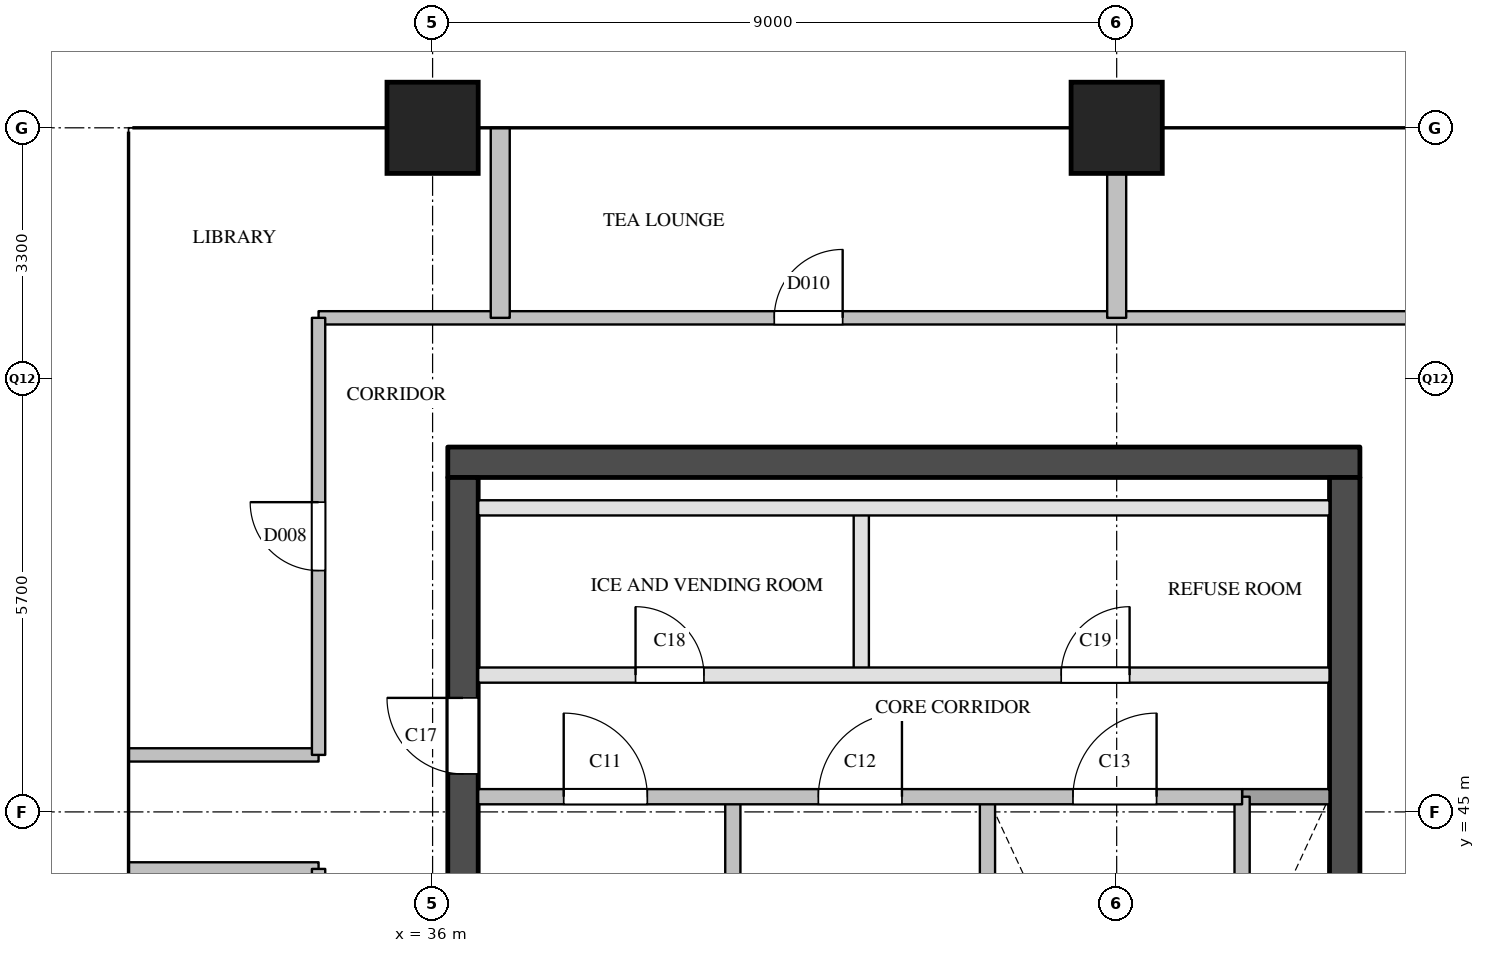
"""IFC4 building model, lengths in metres.
Left out: names, types, materials, properties, quantities, classifications, styles, units other than length and angle.
Written with IfcOpenShell. Run it as: python <this file> out.ifc"""

import sys

from ifc_helpers import new_model, si_unit, direction, frame, frame_2d, origin, origin_2d, place, context, subcontext, project, spatial, rectangle, extrude, element, fill, save


model = new_model("IFC4")
c1 = context("Model", 3, precision=1e-05, world=origin(), true_north=direction((0.0, 1.0)))
c2 = subcontext(c1, "Body", "Model", "MODEL_VIEW")
j1 = project(units=[si_unit("LENGTHUNIT", "METRE"), si_unit("PLANEANGLEUNIT", "RADIAN")], contexts=[c1])
p1 = place(None, origin())
s1 = spatial("IfcSite", under=j1, at=p1, CompositionType="ELEMENT")
p2 = place(p1, origin())
s2 = spatial("IfcBuilding", under=s1, at=p2, CompositionType="ELEMENT")
p3 = place(p2, frame((0.0, 0.0, 218.9)))
s3 = spatial("IfcBuildingStorey", under=s2, at=p3, CompositionType="ELEMENT", Elevation=218.9)
for number, where, z_axis, x_axis in (
    (1, (36.0, 54.0, 0.0), (0.0, 0.0, 1.0), (1.0, 0.0, 0.0)),
    (2, (45.0, 54.0, 0.0), (0.0, 0.0, 1.0), (1.0, 0.0, 0.0)),
):
    element("IfcColumn", number, at=place(p3, frame(where, z_axis=z_axis, x_axis=x_axis)), inside=s3, PredefinedType="COLUMN", context=c2, shape_type="SweptSolid", body=[
        extrude(rectangle(XDim=1.2, YDim=1.2, at=origin_2d()), origin(), (0.0, 0.0, 1.0), 3.9),
    ])
p4 = place(p3, frame((36.2, 49.6, 0.0), z_axis=(0.0, 0.0, 1.0), x_axis=(1.0, 0.0, 0.0)))
e3 = element("IfcWall", 3, at=p4, inside=s3, PredefinedType="SHEAR", context=c2, shape_type="SweptSolid", body=[
    extrude(rectangle(XDim=12.0, YDim=0.4, at=frame_2d((6.0, 0.0))), origin(), (0.0, 0.0, 1.0), 3.6),
])
p5 = place(p3, frame((36.4, 29.1, 0.0), z_axis=(0.0, 0.0, 1.0), x_axis=(0.0, 1.0, 0.0)))
e4 = element("IfcWall", 4, at=p5, inside=s3, PredefinedType="SHEAR", context=c2, shape_type="SweptSolid", body=[
    extrude(rectangle(XDim=20.3, YDim=0.4, at=frame_2d((10.15, 0.0))), origin(), (0.0, 0.0, 1.0), 3.6),
])
p6 = place(p5, frame((3.6, 0.0, 0.0)))
e5 = element("IfcOpeningElement", 5, at=p6, cuts=e4, PredefinedType="OPENING", context=c2, shape_type="SweptSolid", body=[
    extrude(rectangle(XDim=1.8, YDim=2.1, at=frame_2d((0.9, 1.05))), frame((0.0, 0.21, 0.0), z_axis=(0.0, -1.0, 0.0), x_axis=(1.0, 0.0, 0.0)), (0.0, 0.0, 1.0), 0.42),
])
p7 = place(p5, frame((16.4, 0.0, 0.0)))
e6 = element("IfcOpeningElement", 6, at=p7, cuts=e4, PredefinedType="OPENING", context=c2, shape_type="SweptSolid", body=[
    extrude(rectangle(XDim=1.0, YDim=2.1, at=frame_2d((0.5, 1.05))), frame((0.0, 0.21, 0.0), z_axis=(0.0, -1.0, 0.0), x_axis=(1.0, 0.0, 0.0)), (0.0, 0.0, 1.0), 0.42),
])
p8 = place(p3, frame((48.0, 29.1, 0.0), z_axis=(0.0, 0.0, 1.0), x_axis=(0.0, 1.0, 0.0)))
e7 = element("IfcWall", 7, at=p8, inside=s3, PredefinedType="SHEAR", context=c2, shape_type="SweptSolid", body=[
    extrude(rectangle(XDim=20.3, YDim=0.4, at=frame_2d((10.15, 0.0))), origin(), (0.0, 0.0, 1.0), 3.6),
])
p9 = place(p8, frame((12.5, 0.0, 0.0)))
e8 = element("IfcOpeningElement", 8, at=p9, cuts=e7, PredefinedType="OPENING", context=c2, shape_type="SweptSolid", body=[
    extrude(rectangle(XDim=0.7, YDim=2.1, at=frame_2d((0.35, 1.05))), frame((0.0, 0.21, 0.0), z_axis=(0.0, -1.0, 0.0), x_axis=(1.0, 0.0, 0.0)), (0.0, 0.0, 1.0), 0.42),
])
p10 = place(p8, frame((3.9, 0.0, 0.0)))
e9 = element("IfcOpeningElement", 9, at=p10, cuts=e7, PredefinedType="OPENING", context=c2, shape_type="SweptSolid", body=[
    extrude(rectangle(XDim=1.8, YDim=2.1, at=frame_2d((0.9, 1.05))), frame((0.0, 0.21, 0.0), z_axis=(0.0, -1.0, 0.0), x_axis=(1.0, 0.0, 0.0)), (0.0, 0.0, 1.0), 0.42),
])
p11 = place(p3, frame((39.95, 40.78, 0.0), z_axis=(0.0, 0.0, 1.0), x_axis=(0.0, 1.0, 0.0)))
e10 = element("IfcWall", 10, at=p11, inside=s3, PredefinedType="SOLIDWALL", context=c2, shape_type="SweptSolid", body=[
    extrude(rectangle(XDim=4.42, YDim=0.2, at=frame_2d((2.21, 0.0))), origin(), (0.0, 0.0, 1.0), 3.6),
])
p12 = place(p3, frame((41.64, 46.8, 0.0), z_axis=(0.0, 0.0, 1.0), x_axis=(0.0, 1.0, 0.0)))
e11 = element("IfcWall", 11, at=p12, inside=s3, PredefinedType="PARTITIONING", context=c2, shape_type="SweptSolid", body=[
    extrude(rectangle(XDim=2.2, YDim=0.2, at=frame_2d((1.1, 0.0))), origin(), (0.0, 0.0, 1.0), 3.6),
])
for number, where, z_axis, x_axis in (
    (12, (43.3, 40.78, 0.0), (0.0, 0.0, 1.0), (0.0, 1.0, 0.0)),
    (13, (46.65, 40.78, 0.0), (0.0, 0.0, 1.0), (0.0, 1.0, 0.0)),
):
    element("IfcWall", number, at=place(p3, frame(where, z_axis=z_axis, x_axis=x_axis)), inside=s3, PredefinedType="SOLIDWALL", context=c2, shape_type="SweptSolid", body=[
        extrude(rectangle(XDim=4.42, YDim=0.2, at=frame_2d((2.21, 0.0))), origin(), (0.0, 0.0, 1.0), 3.6),
    ])
p13 = place(p3, frame((46.65, 45.2, 0.0), z_axis=(0.0, 0.0, 1.0), x_axis=(1.0, 0.0, 0.0)))
e14 = element("IfcWall", 14, at=p13, inside=s3, PredefinedType="SOLIDWALL", context=c2, shape_type="SweptSolid", body=[
    extrude(rectangle(XDim=1.15, YDim=0.2, at=frame_2d((0.575, 0.0))), origin(), (0.0, 0.0, 1.0), 3.6),
])
p14 = place(p3, frame((36.6, 45.2, 0.0), z_axis=(0.0, 0.0, 1.0), x_axis=(1.0, 0.0, 0.0)))
e15 = element("IfcWall", 15, at=p14, inside=s3, PredefinedType="SOLIDWALL", context=c2, shape_type="SweptSolid", body=[
    extrude(rectangle(XDim=10.05, YDim=0.2, at=frame_2d((5.025, 0.0))), origin(), (0.0, 0.0, 1.0), 3.6),
])
p15 = place(p14, frame((1.125, 0.0, 0.0)))
e16 = element("IfcOpeningElement", 16, at=p15, cuts=e15, PredefinedType="OPENING", context=c2, shape_type="SweptSolid", body=[
    extrude(rectangle(XDim=1.1, YDim=2.1, at=frame_2d((0.55, 1.05))), frame((0.0, 0.11, 0.0), z_axis=(0.0, -1.0, 0.0), x_axis=(1.0, 0.0, 0.0)), (0.0, 0.0, 1.0), 0.22),
])
p16 = place(p14, frame((4.475, 0.0, 0.0)))
e17 = element("IfcOpeningElement", 17, at=p16, cuts=e15, PredefinedType="OPENING", context=c2, shape_type="SweptSolid", body=[
    extrude(rectangle(XDim=1.1, YDim=2.1, at=frame_2d((0.55, 1.05))), frame((0.0, 0.11, 0.0), z_axis=(0.0, -1.0, 0.0), x_axis=(1.0, 0.0, 0.0)), (0.0, 0.0, 1.0), 0.22),
])
p17 = place(p14, frame((7.825, 0.0, 0.0)))
e18 = element("IfcOpeningElement", 18, at=p17, cuts=e15, PredefinedType="OPENING", context=c2, shape_type="SweptSolid", body=[
    extrude(rectangle(XDim=1.1, YDim=2.1, at=frame_2d((0.55, 1.05))), frame((0.0, 0.11, 0.0), z_axis=(0.0, -1.0, 0.0), x_axis=(1.0, 0.0, 0.0)), (0.0, 0.0, 1.0), 0.22),
])
p18 = place(p3, frame((36.6, 46.8, 0.0), z_axis=(0.0, 0.0, 1.0), x_axis=(1.0, 0.0, 0.0)))
e19 = element("IfcWall", 19, at=p18, inside=s3, PredefinedType="PARTITIONING", context=c2, shape_type="SweptSolid", body=[
    extrude(rectangle(XDim=11.2, YDim=0.2, at=frame_2d((5.6, 0.0))), origin(), (0.0, 0.0, 1.0), 3.6),
])
p19 = place(p18, frame((2.07, 0.0, 0.0)))
e20 = element("IfcOpeningElement", 20, at=p19, cuts=e19, PredefinedType="OPENING", context=c2, shape_type="SweptSolid", body=[
    extrude(rectangle(XDim=0.9, YDim=2.1, at=frame_2d((0.45, 1.05))), frame((0.0, 0.11, 0.0), z_axis=(0.0, -1.0, 0.0), x_axis=(1.0, 0.0, 0.0)), (0.0, 0.0, 1.0), 0.22),
])
p20 = place(p18, frame((7.67, 0.0, 0.0)))
e21 = element("IfcOpeningElement", 21, at=p20, cuts=e19, PredefinedType="OPENING", context=c2, shape_type="SweptSolid", body=[
    extrude(rectangle(XDim=0.9, YDim=2.1, at=frame_2d((0.45, 1.05))), frame((0.0, 0.11, 0.0), z_axis=(0.0, -1.0, 0.0), x_axis=(1.0, 0.0, 0.0)), (0.0, 0.0, 1.0), 0.22),
])
p21 = place(p3, frame((36.6, 49.0, 0.0), z_axis=(0.0, 0.0, 1.0), x_axis=(1.0, 0.0, 0.0)))
e22 = element("IfcWall", 22, at=p21, inside=s3, PredefinedType="PARTITIONING", context=c2, shape_type="SweptSolid", body=[
    extrude(rectangle(XDim=11.2, YDim=0.2, at=frame_2d((5.6, 0.0))), origin(), (0.0, 0.0, 1.0), 3.6),
])
for number, where, z_axis, x_axis in (
    (23, (32.0, 44.25, 0.0), (0.0, 0.0, 1.0), (1.0, 0.0, 0.0)),
    (24, (32.0, 45.75, 0.0), (0.0, 0.0, 1.0), (1.0, 0.0, 0.0)),
):
    element("IfcWall", number, at=place(p3, frame(where, z_axis=z_axis, x_axis=x_axis)), inside=s3, PredefinedType="PARTITIONING", context=c2, shape_type="SweptSolid", body=[
        extrude(rectangle(XDim=2.5, YDim=0.175, at=frame_2d((1.25, 0.0))), origin(), (0.0, 0.0, 1.0), 3.6),
    ])
p22 = place(p3, frame((34.5, 51.5, 0.0), z_axis=(0.0, 0.0, 1.0), x_axis=(1.0, 0.0, 0.0)))
e25 = element("IfcWall", 25, at=p22, inside=s3, PredefinedType="PARTITIONING", context=c2, shape_type="SweptSolid", body=[
    extrude(rectangle(XDim=15.4, YDim=0.175, at=frame_2d((7.7, 0.0))), origin(), (0.0, 0.0, 1.0), 3.6),
])
p23 = place(p22, frame((5.995, 0.0, 0.0)))
e26 = element("IfcOpeningElement", 26, at=p23, cuts=e25, PredefinedType="OPENING", context=c2, shape_type="SweptSolid", body=[
    extrude(rectangle(XDim=0.9, YDim=2.1, at=frame_2d((0.45, 1.05))), frame((0.0, 0.097, 0.0), z_axis=(0.0, -1.0, 0.0), x_axis=(1.0, 0.0, 0.0)), (0.0, 0.0, 1.0), 0.195),
])
p24 = place(p3, frame((34.5, 28.5, 0.0), z_axis=(0.0, 0.0, 1.0), x_axis=(0.0, 1.0, 0.0)))
e27 = element("IfcWall", 27, at=p24, inside=s3, PredefinedType="PARTITIONING", context=c2, shape_type="SweptSolid", body=[
    extrude(rectangle(XDim=15.75, YDim=0.175, at=frame_2d((7.875, 0.0))), origin(), (0.0, 0.0, 1.0), 3.6),
])
p25 = place(p24, frame((3.3, 0.0, 0.0)))
e28 = element("IfcOpeningElement", 28, at=p25, cuts=e27, PredefinedType="OPENING", context=c2, shape_type="SweptSolid", body=[
    extrude(rectangle(XDim=0.9, YDim=2.1, at=frame_2d((0.45, 1.05))), frame((0.0, 0.097, 0.0), z_axis=(0.0, -1.0, 0.0), x_axis=(1.0, 0.0, 0.0)), (0.0, 0.0, 1.0), 0.195),
])
p26 = place(p24, frame((11.175, 0.0, 0.0)))
e29 = element("IfcOpeningElement", 29, at=p26, cuts=e27, PredefinedType="OPENING", context=c2, shape_type="SweptSolid", body=[
    extrude(rectangle(XDim=0.9, YDim=2.1, at=frame_2d((0.45, 1.05))), frame((0.0, 0.097, 0.0), z_axis=(0.0, -1.0, 0.0), x_axis=(1.0, 0.0, 0.0)), (0.0, 0.0, 1.0), 0.195),
])
p27 = place(p3, frame((34.5, 45.75, 0.0), z_axis=(0.0, 0.0, 1.0), x_axis=(0.0, 1.0, 0.0)))
e30 = element("IfcWall", 30, at=p27, inside=s3, PredefinedType="PARTITIONING", context=c2, shape_type="SweptSolid", body=[
    extrude(rectangle(XDim=5.75, YDim=0.175, at=frame_2d((2.875, 0.0))), origin(), (0.0, 0.0, 1.0), 3.6),
])
p28 = place(p27, frame((2.425, 0.0, 0.0)))
e31 = element("IfcOpeningElement", 31, at=p28, cuts=e30, PredefinedType="OPENING", context=c2, shape_type="SweptSolid", body=[
    extrude(rectangle(XDim=0.9, YDim=2.1, at=frame_2d((0.45, 1.05))), frame((0.0, 0.097, 0.0), z_axis=(0.0, -1.0, 0.0), x_axis=(1.0, 0.0, 0.0)), (0.0, 0.0, 1.0), 0.195),
])
p29 = place(p3, frame((36.89, 51.5, 0.0), z_axis=(0.0, 0.0, 1.0), x_axis=(0.0, 1.0, 0.0)))
e32 = element("IfcWall", 32, at=p29, inside=s3, PredefinedType="PARTITIONING", context=c2, shape_type="SweptSolid", body=[
    extrude(rectangle(XDim=2.5, YDim=0.25, at=frame_2d((1.25, 0.0))), origin(), (0.0, 0.0, 1.0), 2.6),
])
p30 = place(p3, frame((45.0, 51.5, 0.0), z_axis=(0.0, 0.0, 1.0), x_axis=(0.0, 1.0, 0.0)))
e33 = element("IfcWall", 33, at=p30, inside=s3, PredefinedType="PARTITIONING", context=c2, shape_type="SweptSolid", body=[
    extrude(rectangle(XDim=2.5, YDim=0.25, at=frame_2d((1.25, 0.0))), origin(), (0.0, 0.0, 1.0), 3.6),
])
p31 = place(p15, origin())
e34 = element("IfcDoor", 34, at=p31, inside=s3, OperationType="SINGLE_SWING_LEFT", PredefinedType="DOOR", context=c2, shape_type="SweptSolid", body=[
    extrude(rectangle(XDim=1.1, YDim=2.1, at=frame_2d((0.55, 1.05))), frame((0.0, 0.025, 0.0), z_axis=(0.0, -1.0, 0.0), x_axis=(1.0, 0.0, 0.0)), (0.0, 0.0, 1.0), 0.05),
])
fill(e16, e34)
p32 = place(p16, origin())
e35 = element("IfcDoor", 35, at=p32, inside=s3, OperationType="SINGLE_SWING_RIGHT", PredefinedType="DOOR", context=c2, shape_type="SweptSolid", body=[
    extrude(rectangle(XDim=1.1, YDim=2.1, at=frame_2d((0.55, 1.05))), frame((0.0, 0.025, 0.0), z_axis=(0.0, -1.0, 0.0), x_axis=(1.0, 0.0, 0.0)), (0.0, 0.0, 1.0), 0.05),
])
fill(e17, e35)
p33 = place(p17, origin())
e36 = element("IfcDoor", 36, at=p33, inside=s3, OperationType="SINGLE_SWING_RIGHT", PredefinedType="DOOR", context=c2, shape_type="SweptSolid", body=[
    extrude(rectangle(XDim=1.1, YDim=2.1, at=frame_2d((0.55, 1.05))), frame((0.0, 0.025, 0.0), z_axis=(0.0, -1.0, 0.0), x_axis=(1.0, 0.0, 0.0)), (0.0, 0.0, 1.0), 0.05),
])
fill(e18, e36)
p34 = place(p7, origin())
e37 = element("IfcDoor", 37, at=p34, inside=s3, OperationType="SINGLE_SWING_RIGHT", PredefinedType="DOOR", context=c2, shape_type="SweptSolid", body=[
    extrude(rectangle(XDim=1.0, YDim=2.1, at=frame_2d((0.5, 1.05))), frame((0.0, 0.025, 0.0), z_axis=(0.0, -1.0, 0.0), x_axis=(1.0, 0.0, 0.0)), (0.0, 0.0, 1.0), 0.05),
])
fill(e6, e37)
p35 = place(p19, origin())
e38 = element("IfcDoor", 38, at=p35, inside=s3, OperationType="SINGLE_SWING_LEFT", PredefinedType="DOOR", context=c2, shape_type="SweptSolid", body=[
    extrude(rectangle(XDim=0.9, YDim=2.1, at=frame_2d((0.45, 1.05))), frame((0.0, 0.025, 0.0), z_axis=(0.0, -1.0, 0.0), x_axis=(1.0, 0.0, 0.0)), (0.0, 0.0, 1.0), 0.05),
])
fill(e20, e38)
p36 = place(p20, origin())
e39 = element("IfcDoor", 39, at=p36, inside=s3, OperationType="SINGLE_SWING_RIGHT", PredefinedType="DOOR", context=c2, shape_type="SweptSolid", body=[
    extrude(rectangle(XDim=0.9, YDim=2.1, at=frame_2d((0.45, 1.05))), frame((0.0, 0.025, 0.0), z_axis=(0.0, -1.0, 0.0), x_axis=(1.0, 0.0, 0.0)), (0.0, 0.0, 1.0), 0.05),
])
fill(e21, e39)
p37 = place(p28, origin())
e40 = element("IfcDoor", 40, at=p37, inside=s3, OperationType="SINGLE_SWING_RIGHT", PredefinedType="DOOR", context=c2, shape_type="SweptSolid", body=[
    extrude(rectangle(XDim=0.9, YDim=2.1, at=frame_2d((0.45, 1.05))), frame((0.0, 0.025, 0.0), z_axis=(0.0, -1.0, 0.0), x_axis=(1.0, 0.0, 0.0)), (0.0, 0.0, 1.0), 0.05),
])
fill(e31, e40)
p38 = place(p23, origin())
e41 = element("IfcDoor", 41, at=p38, inside=s3, OperationType="SINGLE_SWING_RIGHT", PredefinedType="DOOR", context=c2, shape_type="SweptSolid", body=[
    extrude(rectangle(XDim=0.9, YDim=2.1, at=frame_2d((0.45, 1.05))), frame((0.0, 0.025, 0.0), z_axis=(0.0, -1.0, 0.0), x_axis=(1.0, 0.0, 0.0)), (0.0, 0.0, 1.0), 0.05),
])
fill(e26, e41)
save(model, sys.argv[1])
